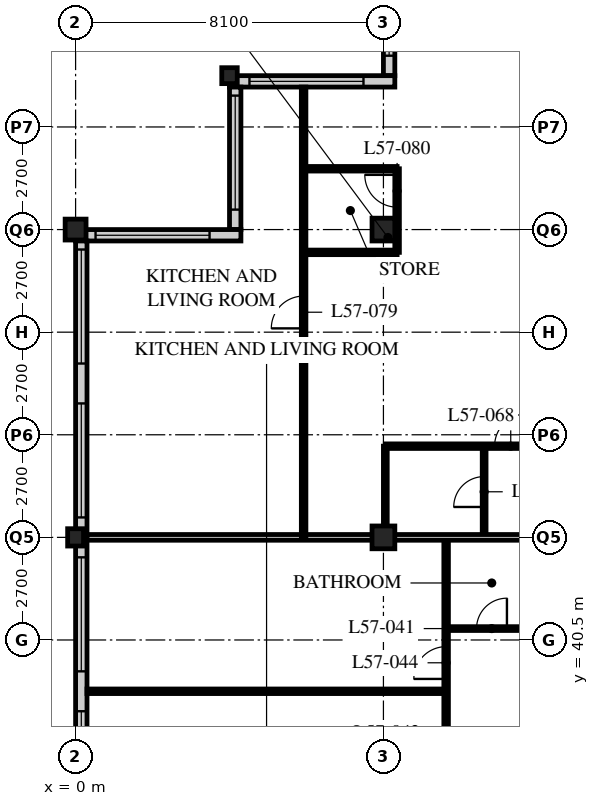
"""IFC4 building model, lengths in metres.
Left out: names, types, materials, properties, quantities, classifications, styles, units other than length and angle.
Written with IfcOpenShell. Run it as: python <this file> out.ifc"""

import sys

from ifc_helpers import new_model, si_unit, direction, frame, frame_2d, origin, origin_2d, place, context, subcontext, project, spatial, rectangle, hollow_rectangle, i_section, extrude, element, fill, save


model = new_model("IFC4")
c1 = context("Model", 3, precision=1e-05, world=origin(), true_north=direction((0.0, 1.0)))
c2 = subcontext(c1, "Body", "Model", "MODEL_VIEW")
j1 = project(units=[si_unit("LENGTHUNIT", "METRE"), si_unit("PLANEANGLEUNIT", "RADIAN")], contexts=[c1])
p1 = place(None, origin())
s1 = spatial("IfcSite", under=j1, at=p1, CompositionType="ELEMENT")
p2 = place(p1, origin())
s2 = spatial("IfcBuilding", under=s1, at=p2, CompositionType="ELEMENT")
p3 = place(p2, frame((0.0, 0.0, 220.8)))
s3 = spatial("IfcBuildingStorey", under=s2, at=p3, CompositionType="ELEMENT", Elevation=220.8)
p4 = place(p3, frame((0.0, 43.2, 0.0), z_axis=(0.0, 0.0, 1.0), x_axis=(1.0, 0.0, 0.0)))
e1 = element("IfcColumn", 1, at=p4, inside=s3, PredefinedType="COLUMN", context=c2, shape_type="SweptSolid", body=[
    extrude(i_section(OverallWidth=0.418, OverallDepth=0.456, WebThickness=0.042, FlangeThickness=0.067, FilletRadius=0.015, at=origin_2d()), origin(), (0.0, 0.0, 1.0), 3.6),
])
p5 = place(p3, frame((0.0, 51.3, 0.0), z_axis=(0.0, 0.0, 1.0), x_axis=(1.0, 0.0, 0.0)))
e2 = element("IfcColumn", 2, at=p5, inside=s3, PredefinedType="COLUMN", context=c2, shape_type="SweptSolid", body=[
    extrude(hollow_rectangle(XDim=0.55, YDim=0.55, WallThickness=0.045, at=origin_2d()), origin(), (0.0, 0.0, 1.0), 3.6),
])
p6 = place(p3, frame((4.05, 55.35, 0.0), z_axis=(0.0, 0.0, 1.0), x_axis=(1.0, 0.0, 0.0)))
e3 = element("IfcColumn", 3, at=p6, inside=s3, PredefinedType="COLUMN", context=c2, shape_type="SweptSolid", body=[
    extrude(i_section(OverallWidth=0.407, OverallDepth=0.419, WebThickness=0.031, FlangeThickness=0.049, FilletRadius=0.015, at=origin_2d()), origin(), (0.0, 0.0, 1.0), 3.6),
])
for number, where, z_axis, x_axis in (
    (4, (8.1, 43.2, 0.0), (0.0, 0.0, 1.0), (1.0, 0.0, 0.0)),
    (5, (8.1, 51.3, 0.0), (0.0, 0.0, 1.0), (1.0, 0.0, 0.0)),
):
    element("IfcColumn", number, at=place(p3, frame(where, z_axis=z_axis, x_axis=x_axis)), inside=s3, PredefinedType="COLUMN", context=c2, shape_type="SweptSolid", body=[
        extrude(hollow_rectangle(XDim=0.6, YDim=0.6, WallThickness=0.05, at=origin_2d()), origin(), (0.0, 0.0, 1.0), 3.6),
    ])
p7 = place(p3, frame((8.25, 59.1, 0.0), z_axis=(0.0, 0.0, 1.0), x_axis=(0.0, -1.0, 0.0)))
e6 = element("IfcWall", 6, at=p7, inside=s3, PredefinedType="SOLIDWALL", context=c2, shape_type="SweptSolid", body=[
    extrude(rectangle(XDim=3.75, YDim=0.3, at=frame_2d((1.875, 0.0))), origin(), (0.0, 0.0, 1.0), 3.39),
])
p8 = place(p7, frame((0.225, 0.0, 0.6)))
e7 = element("IfcOpeningElement", 7, at=p8, cuts=e6, PredefinedType="OPENING", context=c2, shape_type="SweptSolid", body=[
    extrude(rectangle(XDim=3.0, YDim=2.0, at=frame_2d((1.5, 1.0))), frame((0.0, 0.16, 0.0), z_axis=(0.0, -1.0, 0.0), x_axis=(1.0, 0.0, 0.0)), (0.0, 0.0, 1.0), 0.32),
])
p9 = place(p3, frame((8.4, 55.2, 0.0), z_axis=(0.0, 0.0, 1.0), x_axis=(-1.0, 0.0, 0.0)))
e8 = element("IfcWall", 8, at=p9, inside=s3, PredefinedType="SOLIDWALL", context=c2, shape_type="SweptSolid", body=[
    extrude(rectangle(XDim=4.35, YDim=0.3, at=frame_2d((2.175, 0.0))), origin(), (0.0, 0.0, 1.0), 3.39),
])
p10 = place(p9, frame((0.825, 0.0, 0.6)))
e9 = element("IfcOpeningElement", 9, at=p10, cuts=e8, PredefinedType="OPENING", context=c2, shape_type="SweptSolid", body=[
    extrude(rectangle(XDim=3.0, YDim=2.0, at=frame_2d((1.5, 1.0))), frame((0.0, 0.16, 0.0), z_axis=(0.0, -1.0, 0.0), x_axis=(1.0, 0.0, 0.0)), (0.0, 0.0, 1.0), 0.32),
])
p11 = place(p3, frame((4.2, 55.05, 0.0), z_axis=(0.0, 0.0, 1.0), x_axis=(0.0, -1.0, 0.0)))
e10 = element("IfcWall", 10, at=p11, inside=s3, PredefinedType="SOLIDWALL", context=c2, shape_type="SweptSolid", body=[
    extrude(rectangle(XDim=3.75, YDim=0.3, at=frame_2d((1.875, 0.0))), origin(), (0.0, 0.0, 1.0), 3.39),
])
p12 = place(p11, frame((0.225, 0.0, 0.6)))
e11 = element("IfcOpeningElement", 11, at=p12, cuts=e10, PredefinedType="OPENING", context=c2, shape_type="SweptSolid", body=[
    extrude(rectangle(XDim=3.0, YDim=2.0, at=frame_2d((1.5, 1.0))), frame((0.0, 0.16, 0.0), z_axis=(0.0, -1.0, 0.0), x_axis=(1.0, 0.0, 0.0)), (0.0, 0.0, 1.0), 0.32),
])
p13 = place(p3, frame((4.35, 51.15, 0.0), z_axis=(0.0, 0.0, 1.0), x_axis=(-1.0, 0.0, 0.0)))
e12 = element("IfcWall", 12, at=p13, inside=s3, PredefinedType="SOLIDWALL", context=c2, shape_type="SweptSolid", body=[
    extrude(rectangle(XDim=4.35, YDim=0.3, at=frame_2d((2.175, 0.0))), origin(), (0.0, 0.0, 1.0), 3.39),
])
p14 = place(p13, frame((0.825, 0.0, 0.6)))
e13 = element("IfcOpeningElement", 13, at=p14, cuts=e12, PredefinedType="OPENING", context=c2, shape_type="SweptSolid", body=[
    extrude(rectangle(XDim=3.0, YDim=2.0, at=frame_2d((1.5, 1.0))), frame((0.0, 0.16, 0.0), z_axis=(0.0, -1.0, 0.0), x_axis=(1.0, 0.0, 0.0)), (0.0, 0.0, 1.0), 0.32),
])
p15 = place(p3, frame((0.15, 51.0, 0.0), z_axis=(0.0, 0.0, 1.0), x_axis=(0.0, -1.0, 0.0)))
e14 = element("IfcWall", 14, at=p15, inside=s3, PredefinedType="SOLIDWALL", context=c2, shape_type="SweptSolid", body=[
    extrude(rectangle(XDim=32.1, YDim=0.3, at=frame_2d((16.05, 0.0))), origin(), (0.0, 0.0, 1.0), 3.39),
])
p16 = place(p15, frame((0.225, 0.0, 0.6)))
e15 = element("IfcOpeningElement", 15, at=p16, cuts=e14, PredefinedType="OPENING", context=c2, shape_type="SweptSolid", body=[
    extrude(rectangle(XDim=3.0, YDim=2.0, at=frame_2d((1.5, 1.0))), frame((0.0, 0.16, 0.0), z_axis=(0.0, -1.0, 0.0), x_axis=(1.0, 0.0, 0.0)), (0.0, 0.0, 1.0), 0.32),
])
p17 = place(p15, frame((4.275, 0.0, 0.6)))
e16 = element("IfcOpeningElement", 16, at=p17, cuts=e14, PredefinedType="OPENING", context=c2, shape_type="SweptSolid", body=[
    extrude(rectangle(XDim=3.0, YDim=2.0, at=frame_2d((1.5, 1.0))), frame((0.0, 0.16, 0.0), z_axis=(0.0, -1.0, 0.0), x_axis=(1.0, 0.0, 0.0)), (0.0, 0.0, 1.0), 0.32),
])
p18 = place(p15, frame((8.325, 0.0, 0.6)))
e17 = element("IfcOpeningElement", 17, at=p18, cuts=e14, PredefinedType="OPENING", context=c2, shape_type="SweptSolid", body=[
    extrude(rectangle(XDim=3.0, YDim=2.0, at=frame_2d((1.5, 1.0))), frame((0.0, 0.16, 0.0), z_axis=(0.0, -1.0, 0.0), x_axis=(1.0, 0.0, 0.0)), (0.0, 0.0, 1.0), 0.32),
])
p19 = place(p15, frame((12.375, 0.0, 0.6)))
e18 = element("IfcOpeningElement", 18, at=p19, cuts=e14, PredefinedType="OPENING", context=c2, shape_type="SweptSolid", body=[
    extrude(rectangle(XDim=3.0, YDim=2.0, at=frame_2d((1.5, 1.0))), frame((0.0, 0.16, 0.0), z_axis=(0.0, -1.0, 0.0), x_axis=(1.0, 0.0, 0.0)), (0.0, 0.0, 1.0), 0.32),
])
p20 = place(p15, frame((16.425, 0.0, 0.6)))
e19 = element("IfcOpeningElement", 19, at=p20, cuts=e14, PredefinedType="OPENING", context=c2, shape_type="SweptSolid", body=[
    extrude(rectangle(XDim=3.0, YDim=2.0, at=frame_2d((1.5, 1.0))), frame((0.0, 0.16, 0.0), z_axis=(0.0, -1.0, 0.0), x_axis=(1.0, 0.0, 0.0)), (0.0, 0.0, 1.0), 0.32),
])
p21 = place(p15, frame((20.475, 0.0, 0.6)))
e20 = element("IfcOpeningElement", 20, at=p21, cuts=e14, PredefinedType="OPENING", context=c2, shape_type="SweptSolid", body=[
    extrude(rectangle(XDim=3.0, YDim=2.0, at=frame_2d((1.5, 1.0))), frame((0.0, 0.16, 0.0), z_axis=(0.0, -1.0, 0.0), x_axis=(1.0, 0.0, 0.0)), (0.0, 0.0, 1.0), 0.32),
])
p22 = place(p15, frame((24.525, 0.0, 0.6)))
e21 = element("IfcOpeningElement", 21, at=p22, cuts=e14, PredefinedType="OPENING", context=c2, shape_type="SweptSolid", body=[
    extrude(rectangle(XDim=3.0, YDim=2.0, at=frame_2d((1.5, 1.0))), frame((0.0, 0.16, 0.0), z_axis=(0.0, -1.0, 0.0), x_axis=(1.0, 0.0, 0.0)), (0.0, 0.0, 1.0), 0.32),
])
p23 = place(p15, frame((28.575, 0.0, 0.6)))
e22 = element("IfcOpeningElement", 22, at=p23, cuts=e14, PredefinedType="OPENING", context=c2, shape_type="SweptSolid", body=[
    extrude(rectangle(XDim=3.0, YDim=2.0, at=frame_2d((1.5, 1.0))), frame((0.0, 0.16, 0.0), z_axis=(0.0, -1.0, 0.0), x_axis=(1.0, 0.0, 0.0)), (0.0, 0.0, 1.0), 0.32),
])
p24 = place(p3, frame((9.75, 18.9, 0.0), z_axis=(0.0, 0.0, 1.0), x_axis=(0.0, 1.0, 0.0)))
e23 = element("IfcWall", 23, at=p24, inside=s3, PredefinedType="PARTITIONING", context=c2, shape_type="SweptSolid", body=[
    extrude(rectangle(XDim=24.3, YDim=0.12, at=frame_2d((12.15, 0.0))), origin(), (0.0, 0.0, 1.0), 3.39),
])
p25 = place(p24, frame((0.975, 0.0, 0.0)))
e24 = element("IfcOpeningElement", 24, at=p25, cuts=e23, PredefinedType="OPENING", context=c2, shape_type="SweptSolid", body=[
    extrude(rectangle(XDim=0.85, YDim=2.1, at=frame_2d((0.425, 1.05))), frame((0.0, 0.07, 0.0), z_axis=(0.0, -1.0, 0.0), x_axis=(1.0, 0.0, 0.0)), (0.0, 0.0, 1.0), 0.14),
])
p26 = place(p24, frame((8.425, 0.0, 0.0)))
e25 = element("IfcOpeningElement", 25, at=p26, cuts=e23, PredefinedType="OPENING", context=c2, shape_type="SweptSolid", body=[
    extrude(rectangle(XDim=0.85, YDim=2.1, at=frame_2d((0.425, 1.05))), frame((0.0, 0.07, 0.0), z_axis=(0.0, -1.0, 0.0), x_axis=(1.0, 0.0, 0.0)), (0.0, 0.0, 1.0), 0.14),
])
p27 = place(p24, frame((12.475, 0.0, 0.0)))
e26 = element("IfcOpeningElement", 26, at=p27, cuts=e23, PredefinedType="OPENING", context=c2, shape_type="SweptSolid", body=[
    extrude(rectangle(XDim=0.85, YDim=2.1, at=frame_2d((0.425, 1.05))), frame((0.0, 0.07, 0.0), z_axis=(0.0, -1.0, 0.0), x_axis=(1.0, 0.0, 0.0)), (0.0, 0.0, 1.0), 0.14),
])
p28 = place(p24, frame((17.175, 0.0, 0.0)))
e27 = element("IfcOpeningElement", 27, at=p28, cuts=e23, PredefinedType="OPENING", context=c2, shape_type="SweptSolid", body=[
    extrude(rectangle(XDim=0.85, YDim=2.1, at=frame_2d((0.425, 1.05))), frame((0.0, 0.07, 0.0), z_axis=(0.0, -1.0, 0.0), x_axis=(1.0, 0.0, 0.0)), (0.0, 0.0, 1.0), 0.14),
])
p29 = place(p24, frame((20.575, 0.0, 0.0)))
e28 = element("IfcOpeningElement", 28, at=p29, cuts=e23, PredefinedType="OPENING", context=c2, shape_type="SweptSolid", body=[
    extrude(rectangle(XDim=0.85, YDim=2.1, at=frame_2d((0.425, 1.05))), frame((0.0, 0.07, 0.0), z_axis=(0.0, -1.0, 0.0), x_axis=(1.0, 0.0, 0.0)), (0.0, 0.0, 1.0), 0.14),
])
p30 = place(p3, frame((12.15, 40.8, 0.0), z_axis=(0.0, 0.0, 1.0), x_axis=(-1.0, 0.0, 0.0)))
e29 = element("IfcWall", 29, at=p30, inside=s3, PredefinedType="PARTITIONING", context=c2, shape_type="SweptSolid", body=[
    extrude(rectangle(XDim=2.4, YDim=0.1, at=frame_2d((1.2, 0.0))), origin(), (0.0, 0.0, 1.0), 3.39),
])
p31 = place(p30, frame((0.8, 0.0, 0.0)))
e30 = element("IfcOpeningElement", 30, at=p31, cuts=e29, PredefinedType="OPENING", context=c2, shape_type="SweptSolid", body=[
    extrude(rectangle(XDim=0.8, YDim=2.1, at=frame_2d((0.4, 1.05))), frame((0.0, 0.06, 0.0), z_axis=(0.0, -1.0, 0.0), x_axis=(1.0, 0.0, 0.0)), (0.0, 0.0, 1.0), 0.12),
])
p32 = place(p3, frame((9.75, 39.15, 0.0), z_axis=(0.0, 0.0, 1.0), x_axis=(-1.0, 0.0, 0.0)))
e31 = element("IfcWall", 31, at=p32, inside=s3, PredefinedType="PARTITIONING", context=c2, shape_type="SweptSolid", body=[
    extrude(rectangle(XDim=9.45, YDim=0.12, at=frame_2d((4.725, 0.0))), origin(), (0.0, 0.0, 1.0), 3.39),
])
p33 = place(p3, frame((10.75, 43.2, 0.0), z_axis=(0.0, 0.0, 1.0), x_axis=(0.0, 1.0, 0.0)))
e32 = element("IfcWall", 32, at=p33, inside=s3, PredefinedType="PARTITIONING", context=c2, shape_type="SweptSolid", body=[
    extrude(rectangle(XDim=2.4, YDim=0.1, at=frame_2d((1.2, 0.0))), origin(), (0.0, 0.0, 1.0), 3.39),
])
p34 = place(p33, frame((0.8, 0.0, 0.0)))
e33 = element("IfcOpeningElement", 33, at=p34, cuts=e32, PredefinedType="OPENING", context=c2, shape_type="SweptSolid", body=[
    extrude(rectangle(XDim=0.8, YDim=2.1, at=frame_2d((0.4, 1.05))), frame((0.0, 0.06, 0.0), z_axis=(0.0, -1.0, 0.0), x_axis=(1.0, 0.0, 0.0)), (0.0, 0.0, 1.0), 0.12),
])
p35 = place(p3, frame((8.15, 43.2, 0.0), z_axis=(0.0, 0.0, 1.0), x_axis=(0.0, 1.0, 0.0)))
e34 = element("IfcWall", 34, at=p35, inside=s3, PredefinedType="PARTITIONING", context=c2, shape_type="SweptSolid", body=[
    extrude(rectangle(XDim=2.4, YDim=0.1, at=frame_2d((1.2, 0.0))), origin(), (0.0, 0.0, 1.0), 2.628),
])
p36 = place(p3, frame((8.15, 45.6, 0.0), z_axis=(0.0, 0.0, 1.0), x_axis=(1.0, 0.0, 0.0)))
e35 = element("IfcWall", 35, at=p36, inside=s3, PredefinedType="PARTITIONING", context=c2, shape_type="SweptSolid", body=[
    extrude(rectangle(XDim=28.3, YDim=0.12, at=frame_2d((14.15, 0.0))), origin(), (0.0, 0.0, 1.0), 3.39),
])
p37 = place(p36, frame((9.025, 0.0, 0.0)))
e36 = element("IfcOpeningElement", 36, at=p37, cuts=e35, PredefinedType="OPENING", context=c2, shape_type="SweptSolid", body=[
    extrude(rectangle(XDim=0.85, YDim=2.1, at=frame_2d((0.425, 1.05))), frame((0.0, 0.07, 0.0), z_axis=(0.0, -1.0, 0.0), x_axis=(1.0, 0.0, 0.0)), (0.0, 0.0, 1.0), 0.14),
])
p38 = place(p36, frame((16.475, 0.0, 0.0)))
e37 = element("IfcOpeningElement", 37, at=p38, cuts=e35, PredefinedType="OPENING", context=c2, shape_type="SweptSolid", body=[
    extrude(rectangle(XDim=0.85, YDim=2.1, at=frame_2d((0.425, 1.05))), frame((0.0, 0.07, 0.0), z_axis=(0.0, -1.0, 0.0), x_axis=(1.0, 0.0, 0.0)), (0.0, 0.0, 1.0), 0.14),
])
p39 = place(p36, frame((20.525, 0.0, 0.0)))
e38 = element("IfcOpeningElement", 38, at=p39, cuts=e35, PredefinedType="OPENING", context=c2, shape_type="SweptSolid", body=[
    extrude(rectangle(XDim=0.85, YDim=2.1, at=frame_2d((0.425, 1.05))), frame((0.0, 0.07, 0.0), z_axis=(0.0, -1.0, 0.0), x_axis=(1.0, 0.0, 0.0)), (0.0, 0.0, 1.0), 0.14),
])
p40 = place(p36, frame((24.575, 0.0, 0.0)))
e39 = element("IfcOpeningElement", 39, at=p40, cuts=e35, PredefinedType="OPENING", context=c2, shape_type="SweptSolid", body=[
    extrude(rectangle(XDim=0.85, YDim=2.1, at=frame_2d((0.425, 1.05))), frame((0.0, 0.07, 0.0), z_axis=(0.0, -1.0, 0.0), x_axis=(1.0, 0.0, 0.0)), (0.0, 0.0, 1.0), 0.14),
])
p41 = place(p36, frame((6.725, 0.0, 0.0)))
e40 = element("IfcOpeningElement", 40, at=p41, cuts=e35, PredefinedType="OPENING", context=c2, shape_type="SweptSolid", body=[
    extrude(rectangle(XDim=0.85, YDim=2.1, at=frame_2d((0.425, 1.05))), frame((0.0, 0.07, 0.0), z_axis=(0.0, -1.0, 0.0), x_axis=(1.0, 0.0, 0.0)), (0.0, 0.0, 1.0), 0.14),
])
p42 = place(p36, frame((2.875, 0.0, 0.0)))
e41 = element("IfcOpeningElement", 41, at=p42, cuts=e35, PredefinedType="OPENING", context=c2, shape_type="SweptSolid", body=[
    extrude(rectangle(XDim=0.85, YDim=2.1, at=frame_2d((0.425, 1.05))), frame((0.0, 0.07, 0.0), z_axis=(0.0, -1.0, 0.0), x_axis=(1.0, 0.0, 0.0)), (0.0, 0.0, 1.0), 0.14),
])
p43 = place(p3, frame((0.3, 43.2, 0.0), z_axis=(0.0, 0.0, 1.0), x_axis=(1.0, 0.0, 0.0)))
e42 = element("IfcWall", 42, at=p43, inside=s3, PredefinedType="PARTITIONING", context=c2, shape_type="SweptSolid", body=[
    extrude(rectangle(XDim=11.85, YDim=0.15, at=frame_2d((5.925, 0.0))), origin(), (0.0, 0.0, 1.0), 2.628),
])
p44 = place(p3, frame((6.0, 43.2, 0.0), z_axis=(0.0, 0.0, 1.0), x_axis=(0.0, 1.0, 0.0)))
e43 = element("IfcWall", 43, at=p44, inside=s3, PredefinedType="PARTITIONING", context=c2, shape_type="SweptSolid", body=[
    extrude(rectangle(XDim=11.85, YDim=0.12, at=frame_2d((5.925, 0.0))), origin(), (0.0, 0.0, 1.0), 3.39),
])
p45 = place(p44, frame((5.5, 0.0, 0.0)))
e44 = element("IfcOpeningElement", 44, at=p45, cuts=e43, PredefinedType="OPENING", context=c2, shape_type="SweptSolid", body=[
    extrude(rectangle(XDim=0.85, YDim=2.1, at=frame_2d((0.425, 1.05))), frame((0.0, 0.07, 0.0), z_axis=(0.0, -1.0, 0.0), x_axis=(1.0, 0.0, 0.0)), (0.0, 0.0, 1.0), 0.14),
])
for number, where, z_axis, x_axis in (
    (45, (6.0, 50.7, 0.0), (0.0, 0.0, 1.0), (1.0, 0.0, 0.0)),
    (46, (6.0, 52.9, 0.0), (0.0, 0.0, 1.0), (1.0, 0.0, 0.0)),
):
    element("IfcWall", number, at=place(p3, frame(where, z_axis=z_axis, x_axis=x_axis)), inside=s3, PredefinedType="PARTITIONING", context=c2, shape_type="SweptSolid", body=[
        extrude(rectangle(XDim=2.46, YDim=0.12, at=frame_2d((1.23, 0.0))), origin(), (0.0, 0.0, 1.0), 3.39),
    ])
p46 = place(p3, frame((8.46, 50.7, 0.0), z_axis=(0.0, 0.0, 1.0), x_axis=(0.0, 1.0, 0.0)))
e47 = element("IfcWall", 47, at=p46, inside=s3, PredefinedType="PARTITIONING", context=c2, shape_type="SweptSolid", body=[
    extrude(rectangle(XDim=2.2, YDim=0.12, at=frame_2d((1.1, 0.0))), origin(), (0.0, 0.0, 1.0), 3.39),
])
p47 = place(p46, frame((1.19, 0.0, 0.0)))
e48 = element("IfcOpeningElement", 48, at=p47, cuts=e47, PredefinedType="OPENING", context=c2, shape_type="SweptSolid", body=[
    extrude(rectangle(XDim=0.85, YDim=2.1, at=frame_2d((0.425, 1.05))), frame((0.0, 0.07, 0.0), z_axis=(0.0, -1.0, 0.0), x_axis=(1.0, 0.0, 0.0)), (0.0, 0.0, 1.0), 0.14),
])
p48 = place(p8, origin())
e49 = element("IfcWindow", 49, at=p48, inside=s3, PartitioningType="SINGLE_PANEL", PredefinedType="WINDOW", context=c2, shape_type="SweptSolid", body=[
    extrude(rectangle(XDim=3.0, YDim=2.0, at=frame_2d((1.5, 1.0))), frame((0.0, 0.03, 0.0), z_axis=(0.0, -1.0, 0.0), x_axis=(1.0, 0.0, 0.0)), (0.0, 0.0, 1.0), 0.06),
])
fill(e7, e49)
p49 = place(p10, origin())
e50 = element("IfcWindow", 50, at=p49, inside=s3, PartitioningType="SINGLE_PANEL", PredefinedType="WINDOW", context=c2, shape_type="SweptSolid", body=[
    extrude(rectangle(XDim=3.0, YDim=2.0, at=frame_2d((1.5, 1.0))), frame((0.0, 0.03, 0.0), z_axis=(0.0, -1.0, 0.0), x_axis=(1.0, 0.0, 0.0)), (0.0, 0.0, 1.0), 0.06),
])
fill(e9, e50)
p50 = place(p12, origin())
e51 = element("IfcWindow", 51, at=p50, inside=s3, PartitioningType="SINGLE_PANEL", PredefinedType="WINDOW", context=c2, shape_type="SweptSolid", body=[
    extrude(rectangle(XDim=3.0, YDim=2.0, at=frame_2d((1.5, 1.0))), frame((0.0, 0.03, 0.0), z_axis=(0.0, -1.0, 0.0), x_axis=(1.0, 0.0, 0.0)), (0.0, 0.0, 1.0), 0.06),
])
fill(e11, e51)
p51 = place(p14, origin())
e52 = element("IfcWindow", 52, at=p51, inside=s3, PartitioningType="SINGLE_PANEL", PredefinedType="WINDOW", context=c2, shape_type="SweptSolid", body=[
    extrude(rectangle(XDim=3.0, YDim=2.0, at=frame_2d((1.5, 1.0))), frame((0.0, 0.03, 0.0), z_axis=(0.0, -1.0, 0.0), x_axis=(1.0, 0.0, 0.0)), (0.0, 0.0, 1.0), 0.06),
])
fill(e13, e52)
p52 = place(p16, origin())
e53 = element("IfcWindow", 53, at=p52, inside=s3, PartitioningType="SINGLE_PANEL", PredefinedType="WINDOW", context=c2, shape_type="SweptSolid", body=[
    extrude(rectangle(XDim=3.0, YDim=2.0, at=frame_2d((1.5, 1.0))), frame((0.0, 0.03, 0.0), z_axis=(0.0, -1.0, 0.0), x_axis=(1.0, 0.0, 0.0)), (0.0, 0.0, 1.0), 0.06),
])
fill(e15, e53)
p53 = place(p17, origin())
e54 = element("IfcWindow", 54, at=p53, inside=s3, PartitioningType="SINGLE_PANEL", PredefinedType="WINDOW", context=c2, shape_type="SweptSolid", body=[
    extrude(rectangle(XDim=3.0, YDim=2.0, at=frame_2d((1.5, 1.0))), frame((0.0, 0.03, 0.0), z_axis=(0.0, -1.0, 0.0), x_axis=(1.0, 0.0, 0.0)), (0.0, 0.0, 1.0), 0.06),
])
fill(e16, e54)
p54 = place(p18, origin())
e55 = element("IfcWindow", 55, at=p54, inside=s3, PartitioningType="SINGLE_PANEL", PredefinedType="WINDOW", context=c2, shape_type="SweptSolid", body=[
    extrude(rectangle(XDim=3.0, YDim=2.0, at=frame_2d((1.5, 1.0))), frame((0.0, 0.03, 0.0), z_axis=(0.0, -1.0, 0.0), x_axis=(1.0, 0.0, 0.0)), (0.0, 0.0, 1.0), 0.06),
])
fill(e17, e55)
p55 = place(p19, origin())
e56 = element("IfcWindow", 56, at=p55, inside=s3, PartitioningType="SINGLE_PANEL", PredefinedType="WINDOW", context=c2, shape_type="SweptSolid", body=[
    extrude(rectangle(XDim=3.0, YDim=2.0, at=frame_2d((1.5, 1.0))), frame((0.0, 0.03, 0.0), z_axis=(0.0, -1.0, 0.0), x_axis=(1.0, 0.0, 0.0)), (0.0, 0.0, 1.0), 0.06),
])
fill(e18, e56)
p56 = place(p31, origin())
e57 = element("IfcDoor", 57, at=p56, inside=s3, OperationType="SINGLE_SWING_RIGHT", PredefinedType="DOOR", context=c2, shape_type="SweptSolid", body=[
    extrude(rectangle(XDim=0.8, YDim=2.1, at=frame_2d((0.4, 1.05))), frame((0.0, 0.025, 0.0), z_axis=(0.0, -1.0, 0.0), x_axis=(1.0, 0.0, 0.0)), (0.0, 0.0, 1.0), 0.05),
])
fill(e30, e57)
p57 = place(p29, origin())
e58 = element("IfcDoor", 58, at=p57, inside=s3, OperationType="SINGLE_SWING_LEFT", PredefinedType="DOOR", context=c2, shape_type="SweptSolid", body=[
    extrude(rectangle(XDim=0.85, YDim=2.1, at=frame_2d((0.425, 1.05))), frame((0.0, 0.025, 0.0), z_axis=(0.0, -1.0, 0.0), x_axis=(1.0, 0.0, 0.0)), (0.0, 0.0, 1.0), 0.05),
])
fill(e28, e58)
p58 = place(p34, origin())
e59 = element("IfcDoor", 59, at=p58, inside=s3, OperationType="SINGLE_SWING_LEFT", PredefinedType="DOOR", context=c2, shape_type="SweptSolid", body=[
    extrude(rectangle(XDim=0.8, YDim=2.1, at=frame_2d((0.4, 1.05))), frame((0.0, 0.025, 0.0), z_axis=(0.0, -1.0, 0.0), x_axis=(1.0, 0.0, 0.0)), (0.0, 0.0, 1.0), 0.05),
])
fill(e33, e59)
p59 = place(p42, origin())
e60 = element("IfcDoor", 60, at=p59, inside=s3, OperationType="SINGLE_SWING_RIGHT", PredefinedType="DOOR", context=c2, shape_type="SweptSolid", body=[
    extrude(rectangle(XDim=0.85, YDim=2.1, at=frame_2d((0.425, 1.05))), frame((0.0, 0.025, 0.0), z_axis=(0.0, -1.0, 0.0), x_axis=(1.0, 0.0, 0.0)), (0.0, 0.0, 1.0), 0.05),
])
fill(e41, e60)
p60 = place(p45, origin())
e61 = element("IfcDoor", 61, at=p60, inside=s3, OperationType="SINGLE_SWING_LEFT", PredefinedType="DOOR", context=c2, shape_type="SweptSolid", body=[
    extrude(rectangle(XDim=0.85, YDim=2.1, at=frame_2d((0.425, 1.05))), frame((0.0, 0.025, 0.0), z_axis=(0.0, -1.0, 0.0), x_axis=(1.0, 0.0, 0.0)), (0.0, 0.0, 1.0), 0.05),
])
fill(e44, e61)
p61 = place(p47, origin())
e62 = element("IfcDoor", 62, at=p61, inside=s3, OperationType="SINGLE_SWING_RIGHT", PredefinedType="DOOR", context=c2, shape_type="SweptSolid", body=[
    extrude(rectangle(XDim=0.85, YDim=2.1, at=frame_2d((0.425, 1.05))), frame((0.0, 0.025, 0.0), z_axis=(0.0, -1.0, 0.0), x_axis=(1.0, 0.0, 0.0)), (0.0, 0.0, 1.0), 0.05),
])
fill(e48, e62)
save(model, sys.argv[1])
